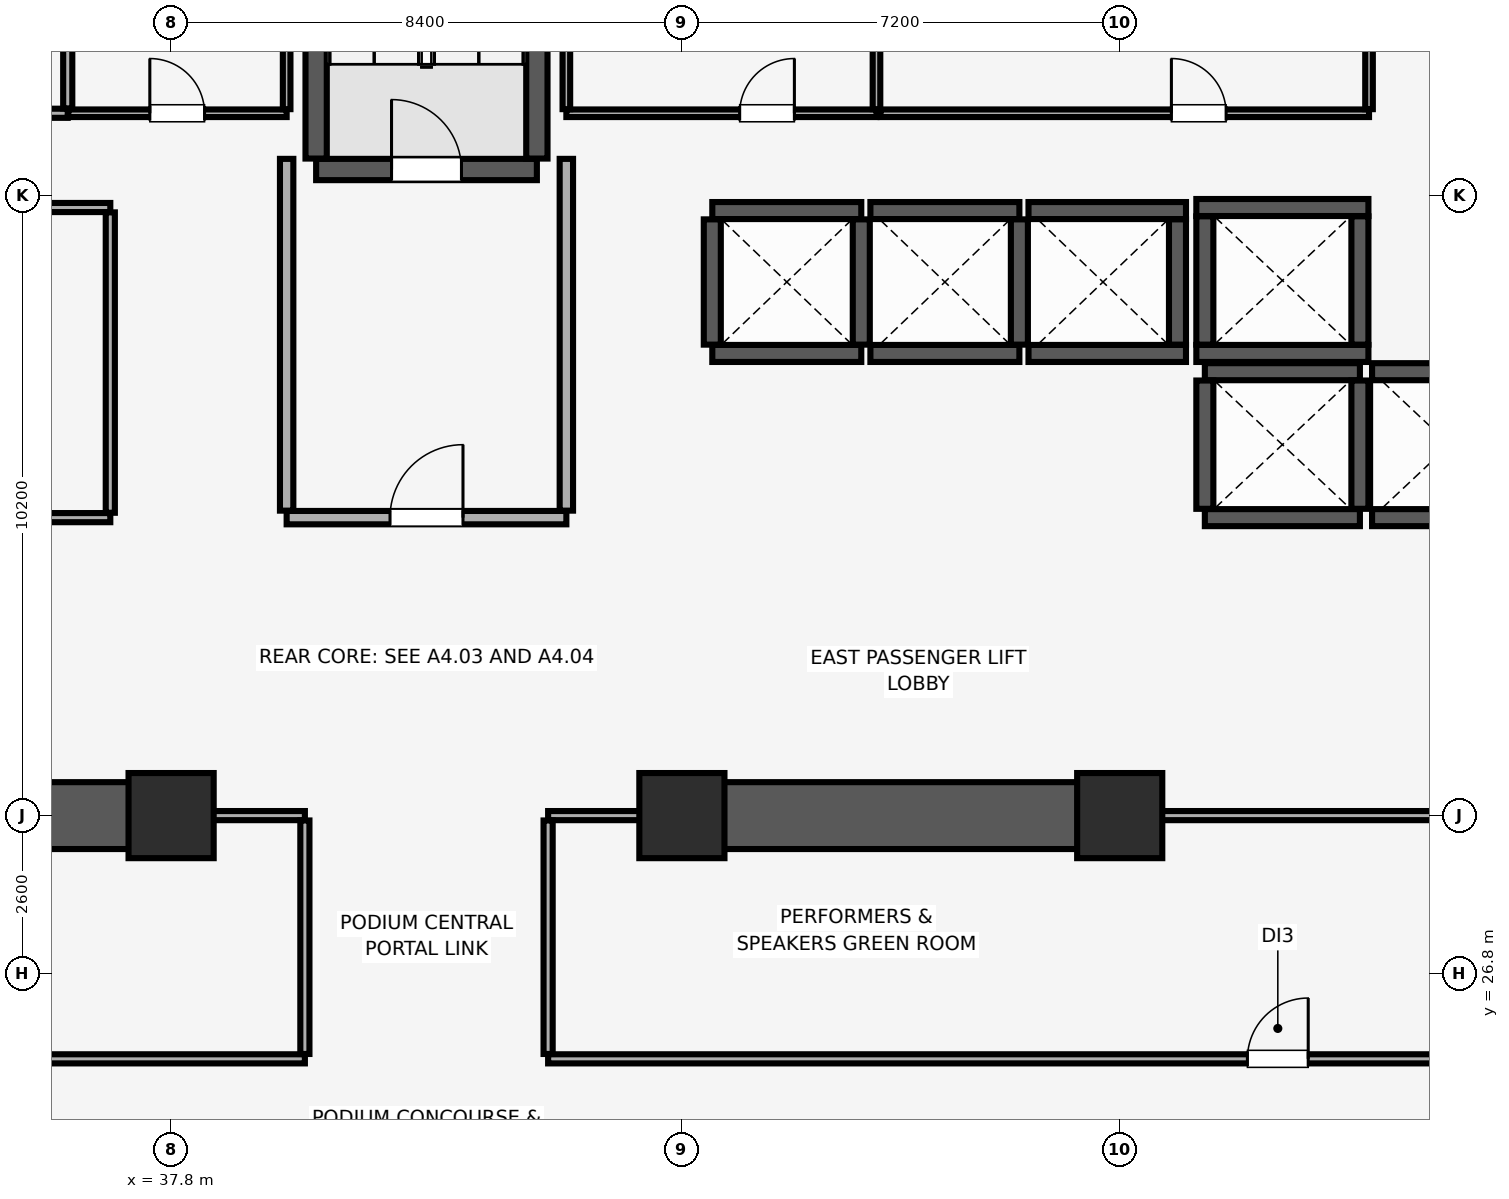
"""IFC4 building model, lengths in metres.
Left out: names, types, materials, properties, quantities, classifications, styles, units other than length and angle.
Written with IfcOpenShell. Run it as: python <this file> out.ifc"""

import sys

from ifc_helpers import new_model, si_unit, direction, frame, frame_2d, origin, origin_2d, place, context, subcontext, project, spatial, rectangle, extrude, element, fill, save


model = new_model("IFC4")
c1 = context("Model", 3, precision=1e-05, world=origin(), true_north=direction((0.0, 1.0)))
c2 = subcontext(c1, "Body", "Model", "MODEL_VIEW")
j1 = project(units=[si_unit("LENGTHUNIT", "METRE"), si_unit("PLANEANGLEUNIT", "RADIAN")], contexts=[c1])
p1 = place(None, origin())
s1 = spatial("IfcSite", under=j1, at=p1, CompositionType="ELEMENT")
p2 = place(p1, origin())
s2 = spatial("IfcBuilding", under=s1, at=p2, CompositionType="ELEMENT")
p3 = place(p2, frame((0.0, 0.0, 19.4)))
s3 = spatial("IfcBuildingStorey", under=s2, at=p3, CompositionType="ELEMENT", Elevation=19.4)
for number, where, z_axis, x_axis in (
    (1, (37.8, 29.4, 0.0), (0.0, 0.0, 1.0), (1.0, 0.0, 0.0)),
    (2, (46.2, 29.4, 0.0), (0.0, 0.0, 1.0), (1.0, 0.0, 0.0)),
    (3, (53.4, 29.4, 0.0), (0.0, 0.0, 1.0), (1.0, 0.0, 0.0)),
):
    element("IfcColumn", number, at=place(p3, frame(where, z_axis=z_axis, x_axis=x_axis)), inside=s3, PredefinedType="COLUMN", context=c2, shape_type="SweptSolid", body=[
        extrude(rectangle(XDim=1.4, YDim=1.4, at=origin_2d()), origin(), (0.0, 0.0, 1.0), 6.28),
    ])
for number, where, z_axis, x_axis in (
    (4, (30.4, 29.4, 0.0), (0.0, 0.0, 1.0), (1.0, 0.0, 0.0)),
    (5, (46.0, 29.4, 0.0), (0.0, 0.0, 1.0), (1.0, 0.0, 0.0)),
):
    element("IfcWall", number, at=place(p3, frame(where, z_axis=z_axis, x_axis=x_axis)), inside=s3, PredefinedType="SHEAR", context=c2, shape_type="SweptSolid", body=[
        extrude(rectangle(XDim=7.6, YDim=1.1, at=frame_2d((3.8, 0.0))), origin(), (0.0, 0.0, 1.0), 6.28),
    ])
p4 = place(p3, frame((40.185, 40.025, 0.0), z_axis=(0.0, 0.0, 1.0), x_axis=(1.0, 0.0, 0.0)))
e6 = element("IfcWall", 6, at=p4, inside=s3, PredefinedType="SHEAR", context=c2, shape_type="SweptSolid", body=[
    extrude(rectangle(XDim=3.63, YDim=0.35, at=frame_2d((1.815, 0.0))), origin(), (0.0, 0.0, 1.0), 6.28),
])
p5 = place(p4, frame((1.24, 0.0, 0.0)))
e7 = element("IfcOpeningElement", 7, at=p5, cuts=e6, PredefinedType="OPENING", context=c2, shape_type="SweptSolid", body=[
    extrude(rectangle(XDim=1.15, YDim=2.15, at=frame_2d((0.575, 1.075))), frame((0.0, 0.185, 0.0), z_axis=(0.0, -1.0, 0.0), x_axis=(1.0, 0.0, 0.0)), (0.0, 0.0, 1.0), 0.37),
])
for number, where, z_axis, x_axis in (
    (8, (40.185, 40.205, 0.0), (0.0, 0.0, 1.0), (0.0, 1.0, 0.0)),
    (9, (43.815, 40.205, 0.0), (0.0, 0.0, 1.0), (0.0, 1.0, 0.0)),
):
    element("IfcWall", number, at=place(p3, frame(where, z_axis=z_axis, x_axis=x_axis)), inside=s3, PredefinedType="SHEAR", context=c2, shape_type="SweptSolid", body=[
        extrude(rectangle(XDim=8.09, YDim=0.35, at=frame_2d((4.045, 0.0))), origin(), (0.0, 0.0, 1.0), 6.28),
    ])
for number, where, z_axis, x_axis in (
    (10, (46.7, 37.0, 0.0), (0.0, 0.0, 1.0), (1.0, 0.0, 0.0)),
    (11, (46.7, 39.35, 0.0), (0.0, 0.0, 1.0), (1.0, 0.0, 0.0)),
):
    element("IfcWall", number, at=place(p3, frame(where, z_axis=z_axis, x_axis=x_axis)), inside=s3, PredefinedType="SHEAR", context=c2, shape_type="SweptSolid", body=[
        extrude(rectangle(XDim=2.45, YDim=0.28, at=frame_2d((1.225, 0.0))), origin(), (0.0, 0.0, 1.0), 6.28),
    ])
for number, where, z_axis, x_axis in (
    (12, (46.7, 37.145, 0.0), (0.0, 0.0, 1.0), (0.0, 1.0, 0.0)),
    (13, (49.15, 37.145, 0.0), (0.0, 0.0, 1.0), (0.0, 1.0, 0.0)),
):
    element("IfcWall", number, at=place(p3, frame(where, z_axis=z_axis, x_axis=x_axis)), inside=s3, PredefinedType="SHEAR", context=c2, shape_type="SweptSolid", body=[
        extrude(rectangle(XDim=2.06, YDim=0.28, at=frame_2d((1.03, 0.0))), origin(), (0.0, 0.0, 1.0), 6.28),
    ])
for number, where, z_axis, x_axis in (
    (14, (49.3, 37.0, 0.0), (0.0, 0.0, 1.0), (1.0, 0.0, 0.0)),
    (15, (49.3, 39.35, 0.0), (0.0, 0.0, 1.0), (1.0, 0.0, 0.0)),
):
    element("IfcWall", number, at=place(p3, frame(where, z_axis=z_axis, x_axis=x_axis)), inside=s3, PredefinedType="SHEAR", context=c2, shape_type="SweptSolid", body=[
        extrude(rectangle(XDim=2.45, YDim=0.28, at=frame_2d((1.225, 0.0))), origin(), (0.0, 0.0, 1.0), 6.28),
    ])
p6 = place(p3, frame((51.75, 37.145, 0.0), z_axis=(0.0, 0.0, 1.0), x_axis=(0.0, 1.0, 0.0)))
e16 = element("IfcWall", 16, at=p6, inside=s3, PredefinedType="SHEAR", context=c2, shape_type="SweptSolid", body=[
    extrude(rectangle(XDim=2.06, YDim=0.28, at=frame_2d((1.03, 0.0))), origin(), (0.0, 0.0, 1.0), 6.28),
])
for number, where, z_axis, x_axis in (
    (17, (51.9, 37.0, 0.0), (0.0, 0.0, 1.0), (1.0, 0.0, 0.0)),
    (18, (51.9, 39.35, 0.0), (0.0, 0.0, 1.0), (1.0, 0.0, 0.0)),
):
    element("IfcWall", number, at=place(p3, frame(where, z_axis=z_axis, x_axis=x_axis)), inside=s3, PredefinedType="SHEAR", context=c2, shape_type="SweptSolid", body=[
        extrude(rectangle(XDim=2.59, YDim=0.28, at=frame_2d((1.295, 0.0))), origin(), (0.0, 0.0, 1.0), 6.28),
    ])
p7 = place(p3, frame((54.35, 37.145, 0.0), z_axis=(0.0, 0.0, 1.0), x_axis=(0.0, 1.0, 0.0)))
e19 = element("IfcWall", 19, at=p7, inside=s3, PredefinedType="SHEAR", context=c2, shape_type="SweptSolid", body=[
    extrude(rectangle(XDim=2.06, YDim=0.28, at=frame_2d((1.03, 0.0))), origin(), (0.0, 0.0, 1.0), 6.28),
])
for number, where, z_axis, x_axis in (
    (20, (54.8, 34.3, 0.0), (0.0, 0.0, 1.0), (1.0, 0.0, 0.0)),
    (21, (54.8, 36.7, 0.0), (0.0, 0.0, 1.0), (1.0, 0.0, 0.0)),
):
    element("IfcWall", number, at=place(p3, frame(where, z_axis=z_axis, x_axis=x_axis)), inside=s3, PredefinedType="SHEAR", context=c2, shape_type="SweptSolid", body=[
        extrude(rectangle(XDim=2.55, YDim=0.28, at=frame_2d((1.275, 0.0))), origin(), (0.0, 0.0, 1.0), 6.28),
    ])
for number, where, z_axis, x_axis in (
    (22, (54.8, 34.445, 0.0), (0.0, 0.0, 1.0), (0.0, 1.0, 0.0)),
    (23, (57.35, 34.445, 0.0), (0.0, 0.0, 1.0), (0.0, 1.0, 0.0)),
):
    element("IfcWall", number, at=place(p3, frame(where, z_axis=z_axis, x_axis=x_axis)), inside=s3, PredefinedType="SHEAR", context=c2, shape_type="SweptSolid", body=[
        extrude(rectangle(XDim=2.11, YDim=0.28, at=frame_2d((1.055, 0.0))), origin(), (0.0, 0.0, 1.0), 6.28),
    ])
for number, where, z_axis, x_axis in (
    (24, (57.55, 34.3, 0.0), (0.0, 0.0, 1.0), (1.0, 0.0, 0.0)),
    (25, (57.55, 36.7, 0.0), (0.0, 0.0, 1.0), (1.0, 0.0, 0.0)),
):
    element("IfcWall", number, at=place(p3, frame(where, z_axis=z_axis, x_axis=x_axis)), inside=s3, PredefinedType="SHEAR", context=c2, shape_type="SweptSolid", body=[
        extrude(rectangle(XDim=2.55, YDim=0.28, at=frame_2d((1.275, 0.0))), origin(), (0.0, 0.0, 1.0), 6.28),
    ])
for number, where, z_axis, x_axis in (
    (26, (54.66, 37.0, 0.0), (0.0, 0.0, 1.0), (1.0, 0.0, 0.0)),
    (27, (54.66, 39.4, 0.0), (0.0, 0.0, 1.0), (1.0, 0.0, 0.0)),
):
    element("IfcWall", number, at=place(p3, frame(where, z_axis=z_axis, x_axis=x_axis)), inside=s3, PredefinedType="SHEAR", context=c2, shape_type="SweptSolid", body=[
        extrude(rectangle(XDim=2.83, YDim=0.28, at=frame_2d((1.415, 0.0))), origin(), (0.0, 0.0, 1.0), 6.28),
    ])
for number, where, z_axis, x_axis in (
    (28, (54.8, 37.145, 0.0), (0.0, 0.0, 1.0), (0.0, 1.0, 0.0)),
    (29, (57.35, 37.145, 0.0), (0.0, 0.0, 1.0), (0.0, 1.0, 0.0)),
):
    element("IfcWall", number, at=place(p3, frame(where, z_axis=z_axis, x_axis=x_axis)), inside=s3, PredefinedType="SHEAR", context=c2, shape_type="SweptSolid", body=[
        extrude(rectangle(XDim=2.11, YDim=0.28, at=frame_2d((1.055, 0.0))), origin(), (0.0, 0.0, 1.0), 6.28),
    ])
p8 = place(p3, frame((39.7, 34.3, 0.0), z_axis=(0.0, 0.0, 1.0), x_axis=(1.0, 0.0, 0.0)))
e30 = element("IfcWall", 30, at=p8, inside=s3, PredefinedType="PARTITIONING", context=c2, shape_type="SweptSolid", body=[
    extrude(rectangle(XDim=4.6, YDim=0.22, at=frame_2d((2.3, 0.0))), origin(), (0.0, 0.0, 1.0), 6.28),
])
p9 = place(p8, frame((1.7, 0.0, 0.0)))
e31 = element("IfcOpeningElement", 31, at=p9, cuts=e30, PredefinedType="OPENING", context=c2, shape_type="SweptSolid", body=[
    extrude(rectangle(XDim=1.2, YDim=2.15, at=frame_2d((0.6, 1.075))), frame((0.0, 0.12, 0.0), z_axis=(0.0, -1.0, 0.0), x_axis=(1.0, 0.0, 0.0)), (0.0, 0.0, 1.0), 0.24),
])
for number, where, z_axis, x_axis in (
    (32, (39.7, 34.415, 0.0), (0.0, 0.0, 1.0), (0.0, 1.0, 0.0)),
    (33, (44.3, 34.415, 0.0), (0.0, 0.0, 1.0), (0.0, 1.0, 0.0)),
):
    element("IfcWall", number, at=place(p3, frame(where, z_axis=z_axis, x_axis=x_axis)), inside=s3, PredefinedType="PARTITIONING", context=c2, shape_type="SweptSolid", body=[
        extrude(rectangle(XDim=5.785, YDim=0.22, at=frame_2d((2.893, 0.0))), origin(), (0.0, 0.0, 1.0), 6.28),
    ])
p10 = place(p3, frame((31.6, 34.3, 0.0), z_axis=(0.0, 0.0, 1.0), x_axis=(1.0, 0.0, 0.0)))
e34 = element("IfcWall", 34, at=p10, inside=s3, PredefinedType="PARTITIONING", context=c2, shape_type="SweptSolid", body=[
    extrude(rectangle(XDim=5.2, YDim=0.15, at=frame_2d((2.6, 0.0))), origin(), (0.0, 0.0, 1.0), 6.28),
])
p11 = place(p10, frame((2.175, 0.0, 0.0)))
e35 = element("IfcOpeningElement", 35, at=p11, cuts=e34, PredefinedType="OPENING", context=c2, shape_type="SweptSolid", body=[
    extrude(rectangle(XDim=0.85, YDim=2.1, at=frame_2d((0.425, 1.05))), frame((0.0, 0.085, 0.0), z_axis=(0.0, -1.0, 0.0), x_axis=(1.0, 0.0, 0.0)), (0.0, 0.0, 1.0), 0.17),
])
p12 = place(p3, frame((31.6, 39.4, 0.0), z_axis=(0.0, 0.0, 1.0), x_axis=(1.0, 0.0, 0.0)))
e36 = element("IfcWall", 36, at=p12, inside=s3, PredefinedType="PARTITIONING", context=c2, shape_type="SweptSolid", body=[
    extrude(rectangle(XDim=5.2, YDim=0.15, at=frame_2d((2.6, 0.0))), origin(), (0.0, 0.0, 1.0), 6.28),
])
p13 = place(p3, frame((36.8, 34.38, 0.0), z_axis=(0.0, 0.0, 1.0), x_axis=(0.0, 1.0, 0.0)))
e37 = element("IfcWall", 37, at=p13, inside=s3, PredefinedType="PARTITIONING", context=c2, shape_type="SweptSolid", body=[
    extrude(rectangle(XDim=4.94, YDim=0.15, at=frame_2d((2.47, 0.0))), origin(), (0.0, 0.0, 1.0), 6.28),
])
p14 = place(p3, frame((28.41, 40.95, 0.0), z_axis=(0.0, 0.0, 1.0), x_axis=(1.0, 0.0, 0.0)))
e38 = element("IfcWall", 38, at=p14, inside=s3, PredefinedType="PARTITIONING", context=c2, shape_type="SweptSolid", body=[
    extrude(rectangle(XDim=7.69, YDim=0.15, at=frame_2d((3.845, 0.0))), origin(), (0.0, 0.0, 1.0), 6.28),
])
p15 = place(p14, frame((3.415, 0.0, 0.0)))
e39 = element("IfcOpeningElement", 39, at=p15, cuts=e38, PredefinedType="OPENING", context=c2, shape_type="SweptSolid", body=[
    extrude(rectangle(XDim=0.85, YDim=2.1, at=frame_2d((0.425, 1.05))), frame((0.0, 0.085, 0.0), z_axis=(0.0, -1.0, 0.0), x_axis=(1.0, 0.0, 0.0)), (0.0, 0.0, 1.0), 0.17),
])
p16 = place(p3, frame((36.1, 41.03, 0.0), z_axis=(0.0, 0.0, 1.0), x_axis=(0.0, 1.0, 0.0)))
e40 = element("IfcWall", 40, at=p16, inside=s3, PredefinedType="PARTITIONING", context=c2, shape_type="SweptSolid", body=[
    extrude(rectangle(XDim=7.19, YDim=0.15, at=frame_2d((3.595, 0.0))), origin(), (0.0, 0.0, 1.0), 6.28),
])
p17 = place(p3, frame((36.11, 40.95, 0.0), z_axis=(0.0, 0.0, 1.0), x_axis=(1.0, 0.0, 0.0)))
e41 = element("IfcWall", 41, at=p17, inside=s3, PredefinedType="PARTITIONING", context=c2, shape_type="SweptSolid", body=[
    extrude(rectangle(XDim=3.59, YDim=0.125, at=frame_2d((1.795, 0.0))), origin(), (0.0, 0.0, 1.0), 6.28),
])
p18 = place(p17, frame((1.34, 0.0, 0.0)))
e42 = element("IfcOpeningElement", 42, at=p18, cuts=e41, PredefinedType="OPENING", context=c2, shape_type="SweptSolid", body=[
    extrude(rectangle(XDim=0.9, YDim=2.1, at=frame_2d((0.45, 1.05))), frame((0.0, 0.073, 0.0), z_axis=(0.0, -1.0, 0.0), x_axis=(1.0, 0.0, 0.0)), (0.0, 0.0, 1.0), 0.145),
])
p19 = place(p3, frame((39.7, 41.018, 0.0), z_axis=(0.0, 0.0, 1.0), x_axis=(0.0, 1.0, 0.0)))
e43 = element("IfcWall", 43, at=p19, inside=s3, PredefinedType="PARTITIONING", context=c2, shape_type="SweptSolid", body=[
    extrude(rectangle(XDim=3.715, YDim=0.125, at=frame_2d((1.857, 0.0))), origin(), (0.0, 0.0, 1.0), 6.28),
])
p20 = place(p3, frame((44.3, 40.95, 0.0), z_axis=(0.0, 0.0, 1.0), x_axis=(1.0, 0.0, 0.0)))
e44 = element("IfcWall", 44, at=p20, inside=s3, PredefinedType="PARTITIONING", context=c2, shape_type="SweptSolid", body=[
    extrude(rectangle(XDim=5.1, YDim=0.125, at=frame_2d((2.55, 0.0))), origin(), (0.0, 0.0, 1.0), 6.28),
])
p21 = place(p20, frame((2.85, 0.0, 0.0)))
e45 = element("IfcOpeningElement", 45, at=p21, cuts=e44, PredefinedType="OPENING", context=c2, shape_type="SweptSolid", body=[
    extrude(rectangle(XDim=0.9, YDim=2.1, at=frame_2d((0.45, 1.05))), frame((0.0, 0.073, 0.0), z_axis=(0.0, -1.0, 0.0), x_axis=(1.0, 0.0, 0.0)), (0.0, 0.0, 1.0), 0.145),
])
for number, where, z_axis, x_axis in (
    (46, (44.3, 41.018, 0.0), (0.0, 0.0, 1.0), (0.0, 1.0, 0.0)),
    (47, (49.4, 41.018, 0.0), (0.0, 0.0, 1.0), (0.0, 1.0, 0.0)),
):
    element("IfcWall", number, at=place(p3, frame(where, z_axis=z_axis, x_axis=x_axis)), inside=s3, PredefinedType="PARTITIONING", context=c2, shape_type="SweptSolid", body=[
        extrude(rectangle(XDim=7.215, YDim=0.125, at=frame_2d((3.607, 0.0))), origin(), (0.0, 0.0, 1.0), 6.28),
    ])
p22 = place(p3, frame((49.468, 40.95, 0.0), z_axis=(0.0, 0.0, 1.0), x_axis=(1.0, 0.0, 0.0)))
e48 = element("IfcWall", 48, at=p22, inside=s3, PredefinedType="PARTITIONING", context=c2, shape_type="SweptSolid", body=[
    extrude(rectangle(XDim=8.032, YDim=0.125, at=frame_2d((4.016, 0.0))), origin(), (0.0, 0.0, 1.0), 6.28),
])
p23 = place(p22, frame((4.782, 0.0, 0.0)))
e49 = element("IfcOpeningElement", 49, at=p23, cuts=e48, PredefinedType="OPENING", context=c2, shape_type="SweptSolid", body=[
    extrude(rectangle(XDim=0.9, YDim=2.1, at=frame_2d((0.45, 1.05))), frame((0.0, 0.073, 0.0), z_axis=(0.0, -1.0, 0.0), x_axis=(1.0, 0.0, 0.0)), (0.0, 0.0, 1.0), 0.145),
])
p24 = place(p3, frame((57.5, 41.018, 0.0), z_axis=(0.0, 0.0, 1.0), x_axis=(0.0, 1.0, 0.0)))
e50 = element("IfcWall", 50, at=p24, inside=s3, PredefinedType="PARTITIONING", context=c2, shape_type="SweptSolid", body=[
    extrude(rectangle(XDim=2.167, YDim=0.125, at=frame_2d((1.084, 0.0))), origin(), (0.0, 0.0, 1.0), 6.28),
])
p25 = place(p3, frame((16.4, 25.4, 0.0), z_axis=(0.0, 0.0, 1.0), x_axis=(1.0, 0.0, 0.0)))
e51 = element("IfcWall", 51, at=p25, inside=s3, PredefinedType="PARTITIONING", context=c2, shape_type="SweptSolid", body=[
    extrude(rectangle(XDim=23.6, YDim=0.15, at=frame_2d((11.8, 0.0))), origin(), (0.0, 0.0, 1.0), 6.28),
])
p26 = place(p25, frame((10.1, 0.0, 0.0)))
e52 = element("IfcOpeningElement", 52, at=p26, cuts=e51, PredefinedType="OPENING", context=c2, shape_type="SweptSolid", body=[
    extrude(rectangle(XDim=1.0, YDim=2.15, at=frame_2d((0.5, 1.075))), frame((0.0, 0.085, 0.0), z_axis=(0.0, -1.0, 0.0), x_axis=(1.0, 0.0, 0.0)), (0.0, 0.0, 1.0), 0.17),
])
p27 = place(p3, frame((38.01, 29.4, 0.0), z_axis=(0.0, 0.0, 1.0), x_axis=(1.0, 0.0, 0.0)))
e53 = element("IfcWall", 53, at=p27, inside=s3, PredefinedType="PARTITIONING", context=c2, shape_type="SweptSolid", body=[
    extrude(rectangle(XDim=1.99, YDim=0.15, at=frame_2d((0.995, 0.0))), origin(), (0.0, 0.0, 1.0), 5.18),
])
p28 = place(p3, frame((40.0, 25.48, 0.0), z_axis=(0.0, 0.0, 1.0), x_axis=(0.0, 1.0, 0.0)))
e54 = element("IfcWall", 54, at=p28, inside=s3, PredefinedType="PARTITIONING", context=c2, shape_type="SweptSolid", body=[
    extrude(rectangle(XDim=3.84, YDim=0.15, at=frame_2d((1.92, 0.0))), origin(), (0.0, 0.0, 1.0), 6.28),
])
p29 = place(p3, frame((44.0, 25.4, 0.0), z_axis=(0.0, 0.0, 1.0), x_axis=(1.0, 0.0, 0.0)))
e55 = element("IfcWall", 55, at=p29, inside=s3, PredefinedType="PARTITIONING", context=c2, shape_type="SweptSolid", body=[
    extrude(rectangle(XDim=23.6, YDim=0.15, at=frame_2d((11.8, 0.0))), origin(), (0.0, 0.0, 1.0), 6.28),
])
p30 = place(p29, frame((11.5, 0.0, 0.0)))
e56 = element("IfcOpeningElement", 56, at=p30, cuts=e55, PredefinedType="OPENING", context=c2, shape_type="SweptSolid", body=[
    extrude(rectangle(XDim=1.0, YDim=2.15, at=frame_2d((0.5, 1.075))), frame((0.0, 0.085, 0.0), z_axis=(0.0, -1.0, 0.0), x_axis=(1.0, 0.0, 0.0)), (0.0, 0.0, 1.0), 0.17),
])
p31 = place(p3, frame((44.0, 29.4, 0.0), z_axis=(0.0, 0.0, 1.0), x_axis=(1.0, 0.0, 0.0)))
e57 = element("IfcWall", 57, at=p31, inside=s3, PredefinedType="PARTITIONING", context=c2, shape_type="SweptSolid", body=[
    extrude(rectangle(XDim=1.99, YDim=0.15, at=frame_2d((0.995, 0.0))), origin(), (0.0, 0.0, 1.0), 5.18),
])
p32 = place(p3, frame((53.61, 29.4, 0.0), z_axis=(0.0, 0.0, 1.0), x_axis=(1.0, 0.0, 0.0)))
e58 = element("IfcWall", 58, at=p32, inside=s3, PredefinedType="PARTITIONING", context=c2, shape_type="SweptSolid", body=[
    extrude(rectangle(XDim=6.78, YDim=0.15, at=frame_2d((3.39, 0.0))), origin(), (0.0, 0.0, 1.0), 5.18),
])
p33 = place(p3, frame((44.0, 25.48, 0.0), z_axis=(0.0, 0.0, 1.0), x_axis=(0.0, 1.0, 0.0)))
e59 = element("IfcWall", 59, at=p33, inside=s3, PredefinedType="PARTITIONING", context=c2, shape_type="SweptSolid", body=[
    extrude(rectangle(XDim=3.84, YDim=0.15, at=frame_2d((1.92, 0.0))), origin(), (0.0, 0.0, 1.0), 6.28),
])
p34 = place(p5, origin())
e60 = element("IfcDoor", 60, at=p34, inside=s3, OperationType="SINGLE_SWING_LEFT", PredefinedType="DOOR", context=c2, shape_type="SweptSolid", body=[
    extrude(rectangle(XDim=1.15, YDim=2.15, at=frame_2d((0.575, 1.075))), frame((0.0, 0.025, 0.0), z_axis=(0.0, -1.0, 0.0), x_axis=(1.0, 0.0, 0.0)), (0.0, 0.0, 1.0), 0.05),
])
fill(e7, e60)
p35 = place(p9, origin())
e61 = element("IfcDoor", 61, at=p35, inside=s3, OperationType="SINGLE_SWING_RIGHT", PredefinedType="DOOR", context=c2, shape_type="SweptSolid", body=[
    extrude(rectangle(XDim=1.2, YDim=2.15, at=frame_2d((0.6, 1.075))), frame((0.0, 0.025, 0.0), z_axis=(0.0, -1.0, 0.0), x_axis=(1.0, 0.0, 0.0)), (0.0, 0.0, 1.0), 0.05),
])
fill(e31, e61)
p36 = place(p18, origin())
e62 = element("IfcDoor", 62, at=p36, inside=s3, OperationType="SINGLE_SWING_LEFT", PredefinedType="DOOR", context=c2, shape_type="SweptSolid", body=[
    extrude(rectangle(XDim=0.9, YDim=2.1, at=frame_2d((0.45, 1.05))), frame((0.0, 0.025, 0.0), z_axis=(0.0, -1.0, 0.0), x_axis=(1.0, 0.0, 0.0)), (0.0, 0.0, 1.0), 0.05),
])
fill(e42, e62)
p37 = place(p21, origin())
e63 = element("IfcDoor", 63, at=p37, inside=s3, OperationType="SINGLE_SWING_RIGHT", PredefinedType="DOOR", context=c2, shape_type="SweptSolid", body=[
    extrude(rectangle(XDim=0.9, YDim=2.1, at=frame_2d((0.45, 1.05))), frame((0.0, 0.025, 0.0), z_axis=(0.0, -1.0, 0.0), x_axis=(1.0, 0.0, 0.0)), (0.0, 0.0, 1.0), 0.05),
])
fill(e45, e63)
p38 = place(p23, origin())
e64 = element("IfcDoor", 64, at=p38, inside=s3, OperationType="SINGLE_SWING_LEFT", PredefinedType="DOOR", context=c2, shape_type="SweptSolid", body=[
    extrude(rectangle(XDim=0.9, YDim=2.1, at=frame_2d((0.45, 1.05))), frame((0.0, 0.025, 0.0), z_axis=(0.0, -1.0, 0.0), x_axis=(1.0, 0.0, 0.0)), (0.0, 0.0, 1.0), 0.05),
])
fill(e49, e64)
p39 = place(p30, origin())
e65 = element("IfcDoor", 65, at=p39, inside=s3, OperationType="SINGLE_SWING_RIGHT", PredefinedType="DOOR", context=c2, shape_type="SweptSolid", body=[
    extrude(rectangle(XDim=1.0, YDim=2.15, at=frame_2d((0.5, 1.075))), frame((0.0, 0.025, 0.0), z_axis=(0.0, -1.0, 0.0), x_axis=(1.0, 0.0, 0.0)), (0.0, 0.0, 1.0), 0.05),
])
fill(e56, e65)
save(model, sys.argv[1])
